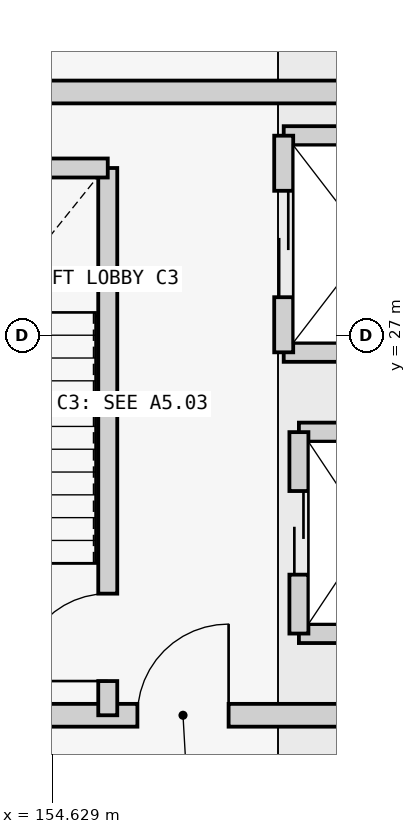
"""IFC4 building model, lengths in metres.
Left out: names, types, materials, properties, quantities, classifications, styles, units other than length and angle.
Written with IfcOpenShell. Run it as: python <this file> out.ifc"""

import sys

from ifc_helpers import new_model, si_unit, direction, frame, frame_2d, origin, place, context, subcontext, project, spatial, rectangle, extrude, element, fill, save


model = new_model("IFC4")
c1 = context("Model", 3, precision=1e-05, world=origin(), true_north=direction((0.0, 1.0)))
c2 = subcontext(c1, "Body", "Model", "MODEL_VIEW")
j1 = project(units=[si_unit("LENGTHUNIT", "METRE"), si_unit("PLANEANGLEUNIT", "RADIAN")], contexts=[c1])
p1 = place(None, origin())
s1 = spatial("IfcSite", under=j1, at=p1, CompositionType="ELEMENT")
p2 = place(p1, origin())
s2 = spatial("IfcBuilding", under=s1, at=p2, CompositionType="ELEMENT")
p3 = place(p2, frame((0.0, 0.0, 8.4)))
s3 = spatial("IfcBuildingStorey", under=s2, at=p3, CompositionType="ELEMENT", Elevation=8.4)
p4 = place(p3, frame((151.0, 22.0, 0.0), z_axis=(0.0, 0.0, 1.0), x_axis=(1.0, 0.0, 0.0)))
e1 = element("IfcWall", 1, at=p4, inside=s3, PredefinedType="SHEAR", context=c2, shape_type="SweptSolid", body=[
    extrude(rectangle(XDim=10.2, YDim=0.3, at=frame_2d((5.1, 0.0))), origin(), (0.0, 0.0, 1.0), 3.935),
])
p5 = place(p4, frame((4.75, 0.0, 0.0)))
e2 = element("IfcOpeningElement", 2, at=p5, cuts=e1, PredefinedType="OPENING", context=c2, shape_type="SweptSolid", body=[
    extrude(rectangle(XDim=1.2, YDim=2.15, at=frame_2d((0.6, 1.075))), frame((0.0, 0.16, 0.0), z_axis=(0.0, -1.0, 0.0), x_axis=(1.0, 0.0, 0.0)), (0.0, 0.0, 1.0), 0.32),
])
p6 = place(p3, frame((161.2, 30.2, 0.0), z_axis=(0.0, 0.0, 1.0), x_axis=(-1.0, 0.0, 0.0)))
e3 = element("IfcWall", 3, at=p6, inside=s3, PredefinedType="SHEAR", context=c2, shape_type="SweptSolid", body=[
    extrude(rectangle(XDim=10.2, YDim=0.3, at=frame_2d((5.1, 0.0))), origin(), (0.0, 0.0, 1.0), 3.935),
])
p7 = place(p3, frame((155.36, 22.0, 0.0), z_axis=(0.0, 0.0, 1.0), x_axis=(0.0, 1.0, 0.0)))
e4 = element("IfcWall", 4, at=p7, inside=s3, PredefinedType="SHEAR", context=c2, shape_type="SweptSolid", body=[
    extrude(rectangle(XDim=7.2, YDim=0.25, at=frame_2d((3.6, 0.0))), origin(), (0.0, 0.0, 1.0), 3.935),
])
p8 = place(p7, frame((0.45, 0.0, 0.0)))
e5 = element("IfcOpeningElement", 5, at=p8, cuts=e4, PredefinedType="OPENING", context=c2, shape_type="SweptSolid", body=[
    extrude(rectangle(XDim=1.15, YDim=2.15, at=frame_2d((0.575, 1.075))), frame((0.0, 0.135, 0.0), z_axis=(0.0, -1.0, 0.0), x_axis=(1.0, 0.0, 0.0)), (0.0, 0.0, 1.0), 0.27),
])
p9 = place(p3, frame((151.0, 29.2, 0.0), z_axis=(0.0, 0.0, 1.0), x_axis=(1.0, 0.0, 0.0)))
e6 = element("IfcWall", 6, at=p9, inside=s3, PredefinedType="SHEAR", context=c2, shape_type="SweptSolid", body=[
    extrude(rectangle(XDim=4.36, YDim=0.25, at=frame_2d((2.18, 0.0))), origin(), (0.0, 0.0, 1.0), 3.935),
])
for number, where, z_axis, x_axis in (
    (7, (157.875, 23.075, 0.0), (0.0, 0.0, 1.0), (1.0, 0.0, 0.0)),
    (8, (157.875, 25.725, 0.0), (0.0, 0.0, 1.0), (1.0, 0.0, 0.0)),
):
    element("IfcWall", number, at=place(p3, frame(where, z_axis=z_axis, x_axis=x_axis)), inside=s3, PredefinedType="SHEAR", context=c2, shape_type="SweptSolid", body=[
        extrude(rectangle(XDim=1.85, YDim=0.25, at=frame_2d((0.925, 0.0))), origin(), (0.0, 0.0, 1.0), 3.935),
    ])
p10 = place(p3, frame((157.875, 23.075, 0.0), z_axis=(0.0, 0.0, 1.0), x_axis=(0.0, 1.0, 0.0)))
e9 = element("IfcWall", 9, at=p10, inside=s3, PredefinedType="SHEAR", context=c2, shape_type="SweptSolid", body=[
    extrude(rectangle(XDim=2.65, YDim=0.25, at=frame_2d((1.325, 0.0))), origin(), (0.0, 0.0, 1.0), 3.935),
])
p11 = place(p10, frame((0.775, 0.0, 0.0)))
e10 = element("IfcOpeningElement", 10, at=p11, cuts=e9, PredefinedType="OPENING", context=c2, shape_type="SweptSolid", body=[
    extrude(rectangle(XDim=1.1, YDim=2.15, at=frame_2d((0.55, 1.075))), frame((0.0, 0.135, 0.0), z_axis=(0.0, -1.0, 0.0), x_axis=(1.0, 0.0, 0.0)), (0.0, 0.0, 1.0), 0.27),
])
for number, where, z_axis, x_axis in (
    (11, (157.675, 26.775, 0.0), (0.0, 0.0, 1.0), (1.0, 0.0, 0.0)),
    (12, (157.675, 29.625, 0.0), (0.0, 0.0, 1.0), (1.0, 0.0, 0.0)),
):
    element("IfcWall", number, at=place(p3, frame(where, z_axis=z_axis, x_axis=x_axis)), inside=s3, PredefinedType="SHEAR", context=c2, shape_type="SweptSolid", body=[
        extrude(rectangle(XDim=2.25, YDim=0.25, at=frame_2d((1.125, 0.0))), origin(), (0.0, 0.0, 1.0), 3.935),
    ])
p12 = place(p3, frame((157.675, 26.775, 0.0), z_axis=(0.0, 0.0, 1.0), x_axis=(0.0, 1.0, 0.0)))
e13 = element("IfcWall", 13, at=p12, inside=s3, PredefinedType="SHEAR", context=c2, shape_type="SweptSolid", body=[
    extrude(rectangle(XDim=2.85, YDim=0.25, at=frame_2d((1.425, 0.0))), origin(), (0.0, 0.0, 1.0), 3.935),
])
p13 = place(p12, frame((0.725, 0.0, 0.0)))
e14 = element("IfcOpeningElement", 14, at=p13, cuts=e13, PredefinedType="OPENING", context=c2, shape_type="SweptSolid", body=[
    extrude(rectangle(XDim=1.4, YDim=2.2, at=frame_2d((0.7, 1.1))), frame((0.0, 0.135, 0.0), z_axis=(0.0, -1.0, 0.0), x_axis=(1.0, 0.0, 0.0)), (0.0, 0.0, 1.0), 0.27),
])
p14 = place(p8, origin())
e15 = element("IfcDoor", 15, at=p14, inside=s3, OperationType="SINGLE_SWING_LEFT", PredefinedType="DOOR", context=c2, shape_type="SweptSolid", body=[
    extrude(rectangle(XDim=1.15, YDim=2.15, at=frame_2d((0.575, 1.075))), frame((0.0, 0.025, 0.0), z_axis=(0.0, -1.0, 0.0), x_axis=(1.0, 0.0, 0.0)), (0.0, 0.0, 1.0), 0.05),
])
fill(e5, e15)
p15 = place(p5, origin())
e16 = element("IfcDoor", 16, at=p15, inside=s3, OperationType="SINGLE_SWING_RIGHT", PredefinedType="DOOR", context=c2, shape_type="SweptSolid", body=[
    extrude(rectangle(XDim=1.2, YDim=2.15, at=frame_2d((0.6, 1.075))), frame((0.0, 0.025, 0.0), z_axis=(0.0, -1.0, 0.0), x_axis=(1.0, 0.0, 0.0)), (0.0, 0.0, 1.0), 0.05),
])
fill(e2, e16)
p16 = place(p11, origin())
e17 = element("IfcDoor", 17, at=p16, inside=s3, OperationType="DOUBLE_DOOR_SLIDING", PredefinedType="USERDEFINED", context=c2, shape_type="SweptSolid", body=[
    extrude(rectangle(XDim=1.1, YDim=2.15, at=frame_2d((0.55, 1.075))), frame((0.0, 0.025, 0.0), z_axis=(0.0, -1.0, 0.0), x_axis=(1.0, 0.0, 0.0)), (0.0, 0.0, 1.0), 0.05),
])
fill(e10, e17)
p17 = place(p13, origin())
e18 = element("IfcDoor", 18, at=p17, inside=s3, OperationType="DOUBLE_DOOR_SLIDING", PredefinedType="USERDEFINED", context=c2, shape_type="SweptSolid", body=[
    extrude(rectangle(XDim=1.4, YDim=2.2, at=frame_2d((0.7, 1.1))), frame((0.0, 0.025, 0.0), z_axis=(0.0, -1.0, 0.0), x_axis=(1.0, 0.0, 0.0)), (0.0, 0.0, 1.0), 0.05),
])
fill(e14, e18)
save(model, sys.argv[1])
